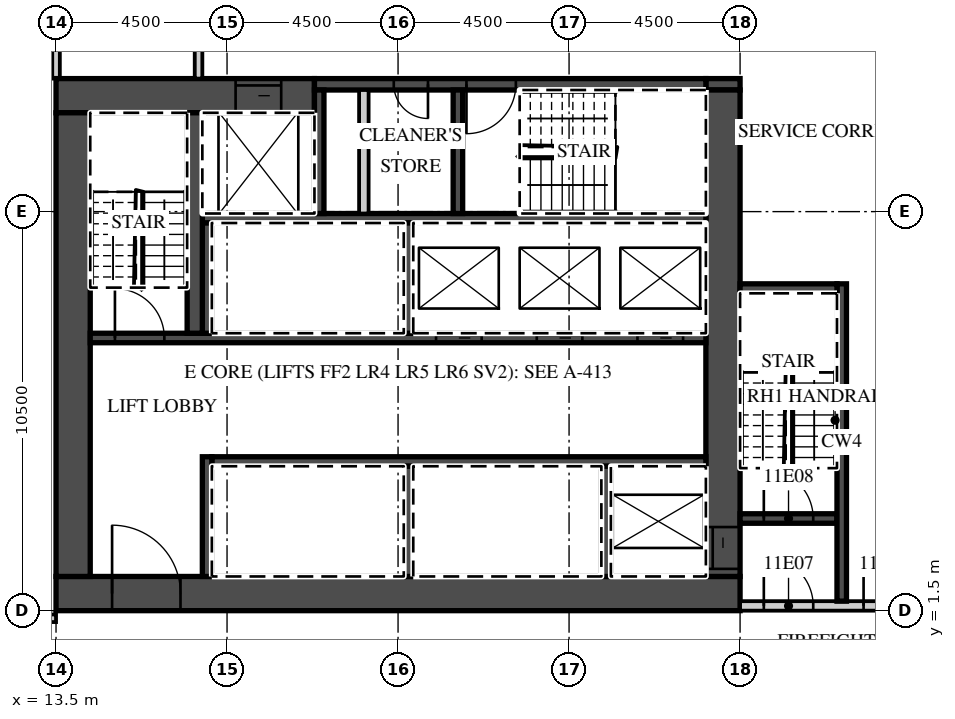
"""IFC4 building model, lengths in metres.
Left out: names, types, materials, properties, quantities, classifications, styles, units other than length and angle.
Written with IfcOpenShell. Run it as: python <this file> out.ifc"""

import sys

from ifc_helpers import new_model, si_unit, direction, frame, frame_2d, origin, place, context, subcontext, project, spatial, rectangle, extrude, element, fill, save


model = new_model("IFC4")
c1 = context("Model", 3, precision=1e-05, world=origin(), true_north=direction((0.0, 1.0)))
c2 = subcontext(c1, "Body", "Model", "MODEL_VIEW")
j1 = project(units=[si_unit("LENGTHUNIT", "METRE"), si_unit("PLANEANGLEUNIT", "RADIAN")], contexts=[c1])
p1 = place(None, origin())
s1 = spatial("IfcSite", under=j1, at=p1, CompositionType="ELEMENT")
p2 = place(p1, origin())
s2 = spatial("IfcBuilding", under=s1, at=p2, CompositionType="ELEMENT")
p3 = place(p2, frame((0.0, 0.0, 66.6)))
s3 = spatial("IfcBuildingStorey", under=s2, at=p3, CompositionType="ELEMENT", Elevation=66.6)
p4 = place(p3, frame((13.5, 15.5, 0.0), z_axis=(0.0, 0.0, 1.0), x_axis=(0.0, 1.0, 0.0)))
e1 = element("IfcWall", 1, at=p4, inside=s3, PredefinedType="PARTITIONING", context=c2, shape_type="SweptSolid", body=[
    extrude(rectangle(XDim=6.05, YDim=0.2, at=frame_2d((3.025, 0.0))), origin(), (0.0, 0.0, 1.0), 3.02),
])
p5 = place(p3, frame((-44.55, 1.3, 0.0), z_axis=(0.0, 0.0, 1.0), x_axis=(1.0, 0.0, 0.0)))
e2 = element("IfcWall", 2, at=p5, inside=s3, PredefinedType="PARTITIONING", context=c2, shape_type="SweptSolid", body=[
    extrude(rectangle(XDim=58.05, YDim=0.2, at=frame_2d((29.025, 0.0))), origin(), (0.0, 0.0, 1.0), 3.02),
])
p6 = place(p5, frame((0.525, 0.0, 0.0)))
e3 = element("IfcOpeningElement", 3, at=p6, cuts=e2, PredefinedType="OPENING", context=c2, shape_type="SweptSolid", body=[
    extrude(rectangle(XDim=1.0, YDim=2.1, at=frame_2d((0.5, 1.05))), frame((0.0, 0.11, 0.0), z_axis=(0.0, -1.0, 0.0), x_axis=(1.0, 0.0, 0.0)), (0.0, 0.0, 1.0), 0.22),
])
p7 = place(p5, frame((6.975, 0.0, 0.0)))
e4 = element("IfcOpeningElement", 4, at=p7, cuts=e2, PredefinedType="OPENING", context=c2, shape_type="SweptSolid", body=[
    extrude(rectangle(XDim=1.0, YDim=2.1, at=frame_2d((0.5, 1.05))), frame((0.0, 0.11, 0.0), z_axis=(0.0, -1.0, 0.0), x_axis=(1.0, 0.0, 0.0)), (0.0, 0.0, 1.0), 0.22),
])
p8 = place(p5, frame((10.987, 0.0, 0.0)))
e5 = element("IfcOpeningElement", 5, at=p8, cuts=e2, PredefinedType="OPENING", context=c2, shape_type="SweptSolid", body=[
    extrude(rectangle(XDim=1.2, YDim=2.1, at=frame_2d((0.6, 1.05))), frame((0.0, 0.11, 0.0), z_axis=(0.0, -1.0, 0.0), x_axis=(1.0, 0.0, 0.0)), (0.0, 0.0, 1.0), 0.22),
])
p9 = place(p5, frame((19.987, 0.0, 0.0)))
e6 = element("IfcOpeningElement", 6, at=p9, cuts=e2, PredefinedType="OPENING", context=c2, shape_type="SweptSolid", body=[
    extrude(rectangle(XDim=1.2, YDim=2.1, at=frame_2d((0.6, 1.05))), frame((0.0, 0.11, 0.0), z_axis=(0.0, -1.0, 0.0), x_axis=(1.0, 0.0, 0.0)), (0.0, 0.0, 1.0), 0.22),
])
p10 = place(p5, frame((29.5, 0.0, 0.0)))
e7 = element("IfcOpeningElement", 7, at=p10, cuts=e2, PredefinedType="OPENING", context=c2, shape_type="SweptSolid", body=[
    extrude(rectangle(XDim=1.0, YDim=2.1, at=frame_2d((0.5, 1.05))), frame((0.0, 0.11, 0.0), z_axis=(0.0, -1.0, 0.0), x_axis=(1.0, 0.0, 0.0)), (0.0, 0.0, 1.0), 0.22),
])
p11 = place(p5, frame((33.975, 0.0, 0.0)))
e8 = element("IfcOpeningElement", 8, at=p11, cuts=e2, PredefinedType="OPENING", context=c2, shape_type="SweptSolid", body=[
    extrude(rectangle(XDim=1.0, YDim=2.1, at=frame_2d((0.5, 1.05))), frame((0.0, 0.11, 0.0), z_axis=(0.0, -1.0, 0.0), x_axis=(1.0, 0.0, 0.0)), (0.0, 0.0, 1.0), 0.22),
])
p12 = place(p5, frame((40.912, 0.0, 0.0)))
e9 = element("IfcOpeningElement", 9, at=p12, cuts=e2, PredefinedType="OPENING", context=c2, shape_type="SweptSolid", body=[
    extrude(rectangle(XDim=1.2, YDim=2.1, at=frame_2d((0.6, 1.05))), frame((0.0, 0.11, 0.0), z_axis=(0.0, -1.0, 0.0), x_axis=(1.0, 0.0, 0.0)), (0.0, 0.0, 1.0), 0.22),
])
p13 = place(p5, frame((47.5, 0.0, 0.0)))
e10 = element("IfcOpeningElement", 10, at=p13, cuts=e2, PredefinedType="OPENING", context=c2, shape_type="SweptSolid", body=[
    extrude(rectangle(XDim=1.0, YDim=2.1, at=frame_2d((0.5, 1.05))), frame((0.0, 0.11, 0.0), z_axis=(0.0, -1.0, 0.0), x_axis=(1.0, 0.0, 0.0)), (0.0, 0.0, 1.0), 0.22),
])
p14 = place(p5, frame((51.975, 0.0, 0.0)))
e11 = element("IfcOpeningElement", 11, at=p14, cuts=e2, PredefinedType="OPENING", context=c2, shape_type="SweptSolid", body=[
    extrude(rectangle(XDim=1.0, YDim=2.1, at=frame_2d((0.5, 1.05))), frame((0.0, 0.11, 0.0), z_axis=(0.0, -1.0, 0.0), x_axis=(1.0, 0.0, 0.0)), (0.0, 0.0, 1.0), 0.22),
])
p15 = place(p5, frame((56.475, 0.0, 0.0)))
e12 = element("IfcOpeningElement", 12, at=p15, cuts=e2, PredefinedType="OPENING", context=c2, shape_type="SweptSolid", body=[
    extrude(rectangle(XDim=1.0, YDim=2.1, at=frame_2d((0.5, 1.05))), frame((0.0, 0.11, 0.0), z_axis=(0.0, -1.0, 0.0), x_axis=(1.0, 0.0, 0.0)), (0.0, 0.0, 1.0), 0.22),
])
p16 = place(p3, frame((13.5, 1.95, 0.0), z_axis=(0.0, 0.0, 1.0), x_axis=(1.0, 0.0, 0.0)))
e13 = element("IfcWall", 13, at=p16, inside=s3, PredefinedType="SHEAR", context=c2, shape_type="SweptSolid", body=[
    extrude(rectangle(XDim=18.0, YDim=0.9, at=frame_2d((9.0, 0.0))), origin(), (0.0, 0.0, 1.0), 3.02),
])
p17 = place(p16, frame((1.475, 0.0, 0.0)))
e14 = element("IfcOpeningElement", 14, at=p17, cuts=e13, PredefinedType="OPENING", context=c2, shape_type="SweptSolid", body=[
    extrude(rectangle(XDim=1.8, YDim=2.1, at=frame_2d((0.9, 1.05))), frame((0.0, 0.46, 0.0), z_axis=(0.0, -1.0, 0.0), x_axis=(1.0, 0.0, 0.0)), (0.0, 0.0, 1.0), 0.92),
])
p18 = place(p3, frame((13.5, 15.05, 0.0), z_axis=(0.0, 0.0, 1.0), x_axis=(1.0, 0.0, 0.0)))
e15 = element("IfcWall", 15, at=p18, inside=s3, PredefinedType="SHEAR", context=c2, shape_type="SweptSolid", body=[
    extrude(rectangle(XDim=6.8, YDim=0.9, at=frame_2d((3.4, 0.0))), origin(), (0.0, 0.0, 1.0), 3.02),
])
p19 = place(p18, frame((4.725, 0.0, 0.0)))
e16 = element("IfcOpeningElement", 16, at=p19, cuts=e15, PredefinedType="OPENING", context=c2, shape_type="SweptSolid", body=[
    extrude(rectangle(XDim=1.2, YDim=2.1, at=frame_2d((0.6, 1.05))), frame((0.0, 0.46, 0.0), z_axis=(0.0, -1.0, 0.0), x_axis=(1.0, 0.0, 0.0)), (0.0, 0.0, 1.0), 0.92),
])
p20 = place(p3, frame((30.6, 15.35, 0.0), z_axis=(0.0, 0.0, 1.0), x_axis=(1.0, 0.0, 0.0)))
e17 = element("IfcWall", 17, at=p20, inside=s3, PredefinedType="SHEAR", context=c2, shape_type="SweptSolid", body=[
    extrude(rectangle(XDim=0.9, YDim=0.3, at=frame_2d((0.45, 0.0))), origin(), (0.0, 0.0, 1.0), 3.02),
])
p21 = place(p3, frame((20.3, 15.35, 0.0), z_axis=(0.0, 0.0, 1.0), x_axis=(1.0, 0.0, 0.0)))
e18 = element("IfcWall", 18, at=p21, inside=s3, PredefinedType="SHEAR", context=c2, shape_type="SweptSolid", body=[
    extrude(rectangle(XDim=10.3, YDim=0.3, at=frame_2d((5.15, 0.0))), origin(), (0.0, 0.0, 1.0), 3.02),
])
p22 = place(p21, frame((4.0, 0.0, 0.0)))
e19 = element("IfcOpeningElement", 19, at=p22, cuts=e18, PredefinedType="OPENING", context=c2, shape_type="SweptSolid", body=[
    extrude(rectangle(XDim=1.3, YDim=2.1, at=frame_2d((0.65, 1.05))), frame((0.0, 0.16, 0.0), z_axis=(0.0, -1.0, 0.0), x_axis=(1.0, 0.0, 0.0)), (0.0, 0.0, 1.0), 0.32),
])
p23 = place(p21, frame((2.087, 0.0, 0.0)))
e20 = element("IfcOpeningElement", 20, at=p23, cuts=e18, PredefinedType="OPENING", context=c2, shape_type="SweptSolid", body=[
    extrude(rectangle(XDim=0.9, YDim=2.1, at=frame_2d((0.45, 1.05))), frame((0.0, 0.16, 0.0), z_axis=(0.0, -1.0, 0.0), x_axis=(1.0, 0.0, 0.0)), (0.0, 0.0, 1.0), 0.32),
])
p24 = place(p3, frame((31.05, 2.4, 0.0), z_axis=(0.0, 0.0, 1.0), x_axis=(0.0, 1.0, 0.0)))
e21 = element("IfcWall", 21, at=p24, inside=s3, PredefinedType="SHEAR", context=c2, shape_type="SweptSolid", body=[
    extrude(rectangle(XDim=12.8, YDim=0.9, at=frame_2d((6.4, 0.0))), origin(), (0.0, 0.0, 1.0), 3.02),
])
p25 = place(p24, frame((0.2, 0.0, 0.0)))
e22 = element("IfcOpeningElement", 22, at=p25, cuts=e21, PredefinedType="OPENING", context=c2, shape_type="SweptSolid", body=[
    extrude(rectangle(XDim=1.1, YDim=2.1, at=frame_2d((0.55, 1.05))), frame((0.0, 0.46, 0.0), z_axis=(0.0, -1.0, 0.0), x_axis=(1.0, 0.0, 0.0)), (0.0, 0.0, 1.0), 0.92),
])
p26 = place(p3, frame((13.95, 2.4, 0.0), z_axis=(0.0, 0.0, 1.0), x_axis=(0.0, 1.0, 0.0)))
e23 = element("IfcWall", 23, at=p26, inside=s3, PredefinedType="SHEAR", context=c2, shape_type="SweptSolid", body=[
    extrude(rectangle(XDim=12.2, YDim=0.9, at=frame_2d((6.1, 0.0))), origin(), (0.0, 0.0, 1.0), 3.02),
])
p27 = place(p3, frame((17.6, 5.425, 0.0), z_axis=(0.0, 0.0, 1.0), x_axis=(1.0, 0.0, 0.0)))
e24 = element("IfcWall", 24, at=p27, inside=s3, PredefinedType="SHEAR", context=c2, shape_type="SweptSolid", body=[
    extrude(rectangle(XDim=13.0, YDim=0.25, at=frame_2d((6.5, 0.0))), origin(), (0.0, 0.0, 1.0), 3.02),
])
p28 = place(p3, frame((17.475, 2.4, 0.0), z_axis=(0.0, 0.0, 1.0), x_axis=(0.0, 1.0, 0.0)))
e25 = element("IfcWall", 25, at=p28, inside=s3, PredefinedType="SHEAR", context=c2, shape_type="SweptSolid", body=[
    extrude(rectangle(XDim=3.15, YDim=0.25, at=frame_2d((1.575, 0.0))), origin(), (0.0, 0.0, 1.0), 3.02),
])
for number, where, z_axis, x_axis in (
    (26, (27.975, 2.4, 0.0), (0.0, 0.0, 1.0), (0.0, 1.0, 0.0)),
    (27, (22.775, 2.4, 0.0), (0.0, 0.0, 1.0), (0.0, 1.0, 0.0)),
):
    element("IfcWall", number, at=place(p3, frame(where, z_axis=z_axis, x_axis=x_axis)), inside=s3, PredefinedType="SHEAR", context=c2, shape_type="SweptSolid", body=[
        extrude(rectangle(XDim=2.9, YDim=0.25, at=frame_2d((1.45, 0.0))), origin(), (0.0, 0.0, 1.0), 3.02),
    ])
p29 = place(p3, frame((14.4, 8.675, 0.0), z_axis=(0.0, 0.0, 1.0), x_axis=(1.0, 0.0, 0.0)))
e28 = element("IfcWall", 28, at=p29, inside=s3, PredefinedType="SHEAR", context=c2, shape_type="SweptSolid", body=[
    extrude(rectangle(XDim=16.2, YDim=0.25, at=frame_2d((8.1, 0.0))), origin(), (0.0, 0.0, 1.0), 3.02),
])
p30 = place(p29, frame((14.4, 0.0, 0.0)))
e29 = element("IfcOpeningElement", 29, at=p30, cuts=e28, PredefinedType="OPENING", context=c2, shape_type="SweptSolid", body=[
    extrude(rectangle(XDim=1.2, YDim=2.1, at=frame_2d((0.6, 1.05))), frame((0.0, 0.135, 0.0), z_axis=(0.0, -1.0, 0.0), x_axis=(1.0, 0.0, 0.0)), (0.0, 0.0, 1.0), 0.27),
])
p31 = place(p29, frame((11.75, 0.0, 0.0)))
e30 = element("IfcOpeningElement", 30, at=p31, cuts=e28, PredefinedType="OPENING", context=c2, shape_type="SweptSolid", body=[
    extrude(rectangle(XDim=1.2, YDim=2.1, at=frame_2d((0.6, 1.05))), frame((0.0, 0.135, 0.0), z_axis=(0.0, -1.0, 0.0), x_axis=(1.0, 0.0, 0.0)), (0.0, 0.0, 1.0), 0.27),
])
p32 = place(p29, frame((9.1, 0.0, 0.0)))
e31 = element("IfcOpeningElement", 31, at=p32, cuts=e28, PredefinedType="OPENING", context=c2, shape_type="SweptSolid", body=[
    extrude(rectangle(XDim=1.2, YDim=2.1, at=frame_2d((0.6, 1.05))), frame((0.0, 0.135, 0.0), z_axis=(0.0, -1.0, 0.0), x_axis=(1.0, 0.0, 0.0)), (0.0, 0.0, 1.0), 0.27),
])
p33 = place(p29, frame((0.65, 0.0, 0.0)))
e32 = element("IfcOpeningElement", 32, at=p33, cuts=e28, PredefinedType="OPENING", context=c2, shape_type="SweptSolid", body=[
    extrude(rectangle(XDim=1.3, YDim=2.1, at=frame_2d((0.65, 1.05))), frame((0.0, 0.135, 0.0), z_axis=(0.0, -1.0, 0.0), x_axis=(1.0, 0.0, 0.0)), (0.0, 0.0, 1.0), 0.27),
])
p34 = place(p3, frame((17.35, 11.825, 0.0), z_axis=(0.0, 0.0, 1.0), x_axis=(1.0, 0.0, 0.0)))
e33 = element("IfcWall", 33, at=p34, inside=s3, PredefinedType="SHEAR", context=c2, shape_type="SweptSolid", body=[
    extrude(rectangle(XDim=13.25, YDim=0.25, at=frame_2d((6.625, 0.0))), origin(), (0.0, 0.0, 1.0), 3.02),
])
for number, where, z_axis, x_axis in (
    (34, (17.475, 8.8, 0.0), (0.0, 0.0, 1.0), (0.0, 1.0, 0.0)),
    (35, (22.775, 8.8, 0.0), (0.0, 0.0, 1.0), (0.0, 1.0, 0.0)),
):
    element("IfcWall", number, at=place(p3, frame(where, z_axis=z_axis, x_axis=x_axis)), inside=s3, PredefinedType="SHEAR", context=c2, shape_type="SweptSolid", body=[
        extrude(rectangle(XDim=2.9, YDim=0.25, at=frame_2d((1.45, 0.0))), origin(), (0.0, 0.0, 1.0), 3.02),
    ])
p35 = place(p3, frame((17.15, 8.8, 0.0), z_axis=(0.0, 0.0, 1.0), x_axis=(0.0, 1.0, 0.0)))
e36 = element("IfcWall", 36, at=p35, inside=s3, PredefinedType="SHEAR", context=c2, shape_type="SweptSolid", body=[
    extrude(rectangle(XDim=5.8, YDim=0.4, at=frame_2d((2.9, 0.0))), origin(), (0.0, 0.0, 1.0), 3.02),
])
for number, where, z_axis, x_axis in (
    (37, (20.425, 11.95, 0.0), (0.0, 0.0, 1.0), (0.0, 1.0, 0.0)),
    (38, (24.075, 11.95, 0.0), (0.0, 0.0, 1.0), (0.0, 1.0, 0.0)),
):
    element("IfcWall", number, at=place(p3, frame(where, z_axis=z_axis, x_axis=x_axis)), inside=s3, PredefinedType="SHEAR", context=c2, shape_type="SweptSolid", body=[
        extrude(rectangle(XDim=3.25, YDim=0.25, at=frame_2d((1.625, 0.0))), origin(), (0.0, 0.0, 1.0), 3.02),
    ])
p36 = place(p3, frame((21.6, 11.95, 0.0), z_axis=(0.0, 0.0, 1.0), x_axis=(0.0, 1.0, 0.0)))
e39 = element("IfcWall", 39, at=p36, inside=s3, PredefinedType="PARTITIONING", context=c2, shape_type="SweptSolid", body=[
    extrude(rectangle(XDim=3.25, YDim=0.25, at=frame_2d((1.625, 0.0))), origin(), (0.0, 0.0, 1.0), 3.02),
])
p37 = place(p3, frame((31.5, 1.625, 0.0), z_axis=(0.0, 0.0, 1.0), x_axis=(1.0, 0.0, 0.0)))
e40 = element("IfcWall", 40, at=p37, inside=s3, PredefinedType="PARTITIONING", context=c2, shape_type="SweptSolid", body=[
    extrude(rectangle(XDim=13.05, YDim=0.25, at=frame_2d((6.525, 0.0))), origin(), (0.0, 0.0, 1.0), 3.02),
])
p38 = place(p37, frame((0.625, 0.0, 0.0)))
e41 = element("IfcOpeningElement", 41, at=p38, cuts=e40, PredefinedType="OPENING", context=c2, shape_type="SweptSolid", body=[
    extrude(rectangle(XDim=1.3, YDim=2.1, at=frame_2d((0.65, 1.05))), frame((0.0, 0.135, 0.0), z_axis=(0.0, -1.0, 0.0), x_axis=(1.0, 0.0, 0.0)), (0.0, 0.0, 1.0), 0.27),
])
p39 = place(p37, frame((3.25, 0.0, 0.0)))
e42 = element("IfcOpeningElement", 42, at=p39, cuts=e40, PredefinedType="OPENING", context=c2, shape_type="SweptSolid", body=[
    extrude(rectangle(XDim=1.1, YDim=2.1, at=frame_2d((0.55, 1.05))), frame((0.0, 0.135, 0.0), z_axis=(0.0, -1.0, 0.0), x_axis=(1.0, 0.0, 0.0)), (0.0, 0.0, 1.0), 0.27),
])
p40 = place(p3, frame((31.5, 3.925, 0.0), z_axis=(0.0, 0.0, 1.0), x_axis=(1.0, 0.0, 0.0)))
e43 = element("IfcWall", 43, at=p40, inside=s3, PredefinedType="SHEAR", context=c2, shape_type="SweptSolid", body=[
    extrude(rectangle(XDim=2.55, YDim=0.25, at=frame_2d((1.275, 0.0))), origin(), (0.0, 0.0, 1.0), 3.02),
])
p41 = place(p40, frame((0.625, 0.0, 0.0)))
e44 = element("IfcOpeningElement", 44, at=p41, cuts=e43, PredefinedType="OPENING", context=c2, shape_type="SweptSolid", body=[
    extrude(rectangle(XDim=1.3, YDim=2.1, at=frame_2d((0.65, 1.05))), frame((0.0, 0.135, 0.0), z_axis=(0.0, -1.0, 0.0), x_axis=(1.0, 0.0, 0.0)), (0.0, 0.0, 1.0), 0.27),
])
p42 = place(p3, frame((34.175, 1.75, 0.0), z_axis=(0.0, 0.0, 1.0), x_axis=(0.0, 1.0, 0.0)))
e45 = element("IfcWall", 45, at=p42, inside=s3, PredefinedType="SHEAR", context=c2, shape_type="SweptSolid", body=[
    extrude(rectangle(XDim=8.35, YDim=0.25, at=frame_2d((4.175, 0.0))), origin(), (0.0, 0.0, 1.0), 3.02),
])
p43 = place(p3, frame((31.5, 9.975, 0.0), z_axis=(0.0, 0.0, 1.0), x_axis=(1.0, 0.0, 0.0)))
e46 = element("IfcWall", 46, at=p43, inside=s3, PredefinedType="SHEAR", context=c2, shape_type="SweptSolid", body=[
    extrude(rectangle(XDim=2.55, YDim=0.25, at=frame_2d((1.275, 0.0))), origin(), (0.0, 0.0, 1.0), 3.02),
])
p44 = place(p3, frame((17.25, 15.5, 0.0), z_axis=(0.0, 0.0, 1.0), x_axis=(0.0, 1.0, 0.0)))
e47 = element("IfcWall", 47, at=p44, inside=s3, PredefinedType="PARTITIONING", context=c2, shape_type="SweptSolid", body=[
    extrude(rectangle(XDim=2.2, YDim=0.2, at=frame_2d((1.1, 0.0))), origin(), (0.0, 0.0, 1.0), 3.02),
])
p45 = place(p30, origin())
e48 = element("IfcDoor", 48, at=p45, inside=s3, OperationType="SLIDING_TO_LEFT", PredefinedType="DOOR", context=c2, shape_type="SweptSolid", body=[
    extrude(rectangle(XDim=1.2, YDim=2.1, at=frame_2d((0.6, 1.05))), frame((0.0, 0.025, 0.0), z_axis=(0.0, -1.0, 0.0), x_axis=(1.0, 0.0, 0.0)), (0.0, 0.0, 1.0), 0.05),
])
fill(e29, e48)
p46 = place(p31, origin())
e49 = element("IfcDoor", 49, at=p46, inside=s3, OperationType="SLIDING_TO_RIGHT", PredefinedType="DOOR", context=c2, shape_type="SweptSolid", body=[
    extrude(rectangle(XDim=1.2, YDim=2.1, at=frame_2d((0.6, 1.05))), frame((0.0, 0.025, 0.0), z_axis=(0.0, -1.0, 0.0), x_axis=(1.0, 0.0, 0.0)), (0.0, 0.0, 1.0), 0.05),
])
fill(e30, e49)
p47 = place(p32, origin())
e50 = element("IfcDoor", 50, at=p47, inside=s3, OperationType="SLIDING_TO_RIGHT", PredefinedType="DOOR", context=c2, shape_type="SweptSolid", body=[
    extrude(rectangle(XDim=1.2, YDim=2.1, at=frame_2d((0.6, 1.05))), frame((0.0, 0.025, 0.0), z_axis=(0.0, -1.0, 0.0), x_axis=(1.0, 0.0, 0.0)), (0.0, 0.0, 1.0), 0.05),
])
fill(e31, e50)
p48 = place(p19, origin())
e51 = element("IfcDoor", 51, at=p48, inside=s3, OperationType="SLIDING_TO_LEFT", PredefinedType="DOOR", context=c2, shape_type="SweptSolid", body=[
    extrude(rectangle(XDim=1.2, YDim=2.1, at=frame_2d((0.6, 1.05))), frame((0.0, 0.025, 0.0), z_axis=(0.0, -1.0, 0.0), x_axis=(1.0, 0.0, 0.0)), (0.0, 0.0, 1.0), 0.05),
])
fill(e16, e51)
p49 = place(p25, origin())
e52 = element("IfcDoor", 52, at=p49, inside=s3, OperationType="SLIDING_TO_LEFT", PredefinedType="DOOR", context=c2, shape_type="SweptSolid", body=[
    extrude(rectangle(XDim=1.1, YDim=2.1, at=frame_2d((0.55, 1.05))), frame((0.0, 0.025, 0.0), z_axis=(0.0, -1.0, 0.0), x_axis=(1.0, 0.0, 0.0)), (0.0, 0.0, 1.0), 0.05),
])
fill(e22, e52)
p50 = place(p17, origin())
e53 = element("IfcDoor", 53, at=p50, inside=s3, OperationType="DOUBLE_DOOR_DOUBLE_SWING", PredefinedType="DOOR", context=c2, shape_type="SweptSolid", body=[
    extrude(rectangle(XDim=1.8, YDim=2.1, at=frame_2d((0.9, 1.05))), frame((0.0, 0.025, 0.0), z_axis=(0.0, -1.0, 0.0), x_axis=(1.0, 0.0, 0.0)), (0.0, 0.0, 1.0), 0.05),
])
fill(e14, e53)
p51 = place(p38, origin())
e54 = element("IfcDoor", 54, at=p51, inside=s3, OperationType="SINGLE_SWING_LEFT", PredefinedType="DOOR", context=c2, shape_type="SweptSolid", body=[
    extrude(rectangle(XDim=1.3, YDim=2.1, at=frame_2d((0.65, 1.05))), frame((0.0, 0.025, 0.0), z_axis=(0.0, -1.0, 0.0), x_axis=(1.0, 0.0, 0.0)), (0.0, 0.0, 1.0), 0.05),
])
fill(e41, e54)
p52 = place(p41, origin())
e55 = element("IfcDoor", 55, at=p52, inside=s3, OperationType="SINGLE_SWING_LEFT", PredefinedType="DOOR", context=c2, shape_type="SweptSolid", body=[
    extrude(rectangle(XDim=1.3, YDim=2.1, at=frame_2d((0.65, 1.05))), frame((0.0, 0.025, 0.0), z_axis=(0.0, -1.0, 0.0), x_axis=(1.0, 0.0, 0.0)), (0.0, 0.0, 1.0), 0.05),
])
fill(e44, e55)
p53 = place(p39, origin())
e56 = element("IfcDoor", 56, at=p53, inside=s3, OperationType="SINGLE_SWING_LEFT", PredefinedType="DOOR", context=c2, shape_type="SweptSolid", body=[
    extrude(rectangle(XDim=1.1, YDim=2.1, at=frame_2d((0.55, 1.05))), frame((0.0, 0.025, 0.0), z_axis=(0.0, -1.0, 0.0), x_axis=(1.0, 0.0, 0.0)), (0.0, 0.0, 1.0), 0.05),
])
fill(e42, e56)
p54 = place(p33, origin())
e57 = element("IfcDoor", 57, at=p54, inside=s3, OperationType="SINGLE_SWING_LEFT", PredefinedType="DOOR", context=c2, shape_type="SweptSolid", body=[
    extrude(rectangle(XDim=1.3, YDim=2.1, at=frame_2d((0.65, 1.05))), frame((0.0, 0.025, 0.0), z_axis=(0.0, -1.0, 0.0), x_axis=(1.0, 0.0, 0.0)), (0.0, 0.0, 1.0), 0.05),
])
fill(e32, e57)
p55 = place(p22, origin())
e58 = element("IfcDoor", 58, at=p55, inside=s3, OperationType="SINGLE_SWING_LEFT", PredefinedType="DOOR", context=c2, shape_type="SweptSolid", body=[
    extrude(rectangle(XDim=1.3, YDim=2.1, at=frame_2d((0.65, 1.05))), frame((0.0, 0.025, 0.0), z_axis=(0.0, -1.0, 0.0), x_axis=(1.0, 0.0, 0.0)), (0.0, 0.0, 1.0), 0.05),
])
fill(e19, e58)
p56 = place(p23, origin())
e59 = element("IfcDoor", 59, at=p56, inside=s3, OperationType="SINGLE_SWING_RIGHT", PredefinedType="DOOR", context=c2, shape_type="SweptSolid", body=[
    extrude(rectangle(XDim=0.9, YDim=2.1, at=frame_2d((0.45, 1.05))), frame((0.0, 0.025, 0.0), z_axis=(0.0, -1.0, 0.0), x_axis=(1.0, 0.0, 0.0)), (0.0, 0.0, 1.0), 0.05),
])
fill(e20, e59)
save(model, sys.argv[1])
